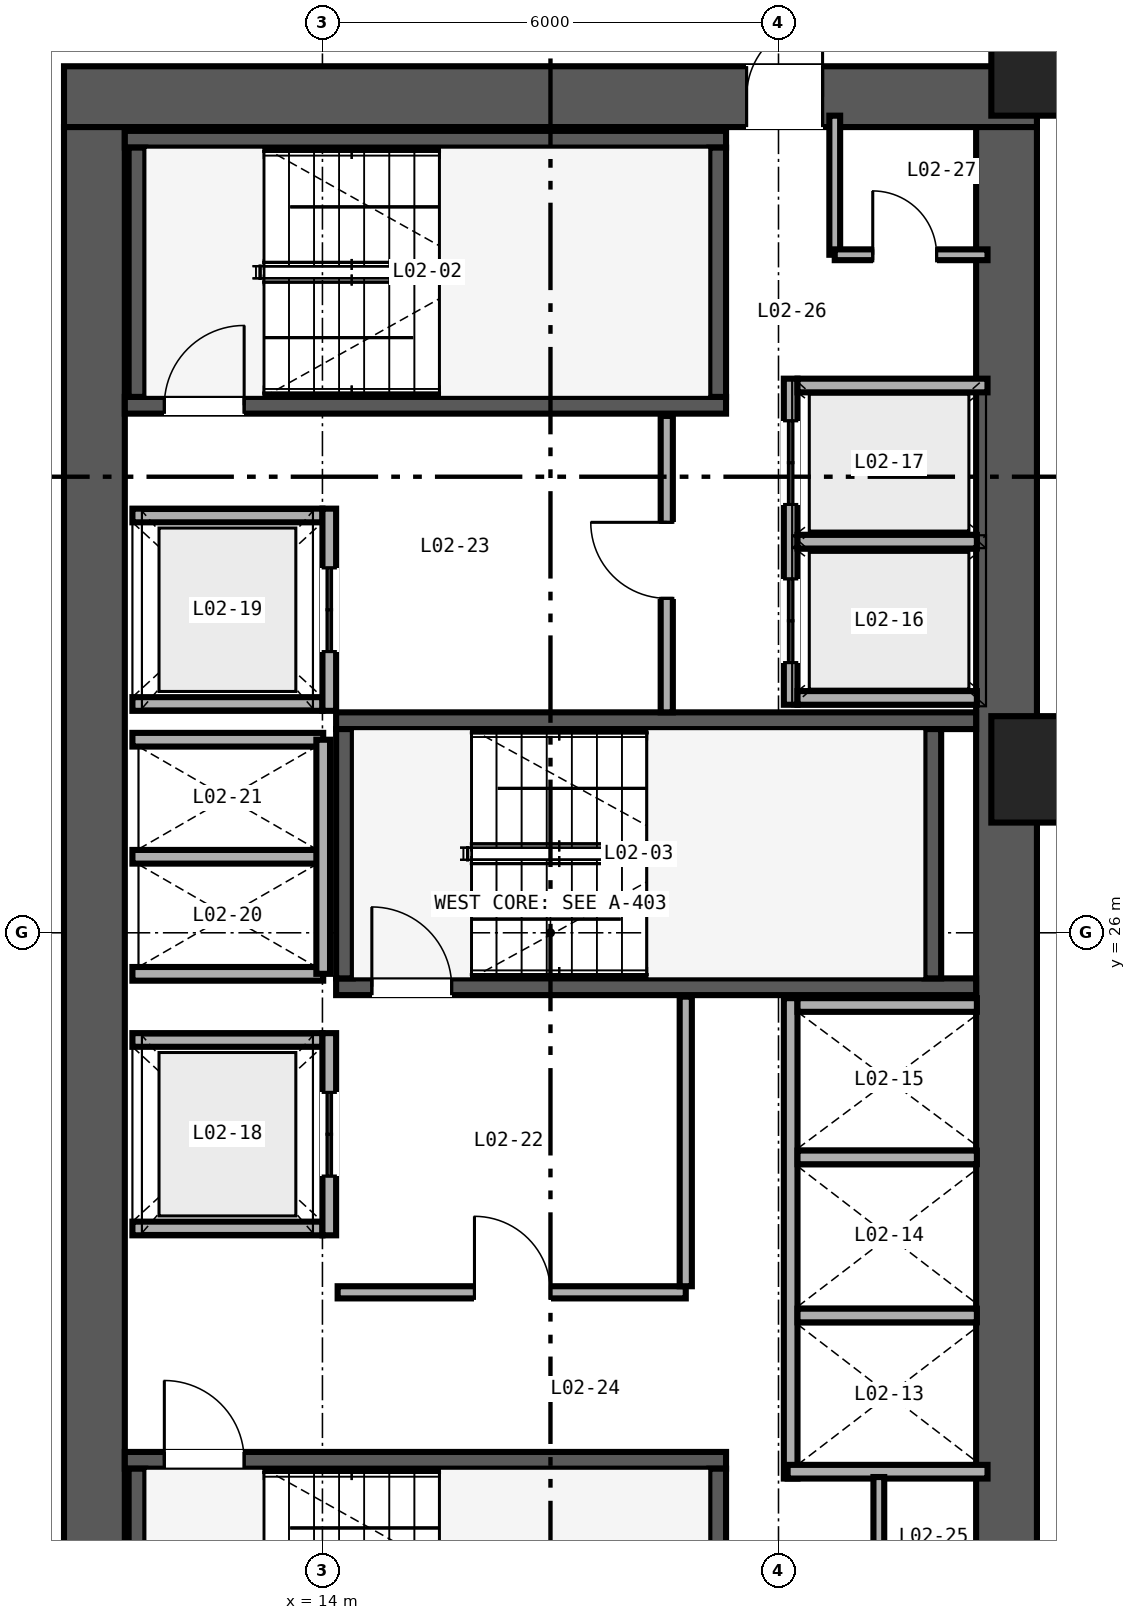
"""IFC4 building model, lengths in metres.
Left out: names, types, materials, properties, quantities, classifications, styles, units other than length and angle.
Written with IfcOpenShell. Run it as: python <this file> out.ifc"""

import sys

from ifc_helpers import new_model, si_unit, direction, frame, frame_2d, origin, origin_2d, place, context, subcontext, project, spatial, rectangle, extrude, source, transform, mapped, element, fill, save


model = new_model("IFC4")
c1 = context("Model", 3, precision=1e-05, world=origin(), true_north=direction((0.0, 1.0)))
c2 = subcontext(c1, "Body", "Model", "MODEL_VIEW")
j1 = project(units=[si_unit("LENGTHUNIT", "METRE"), si_unit("PLANEANGLEUNIT", "RADIAN")], contexts=[c1])
p1 = place(None, origin())
s1 = spatial("IfcSite", under=j1, at=p1, CompositionType="ELEMENT")
p2 = place(p1, origin())
s2 = spatial("IfcBuilding", under=s1, at=p2, CompositionType="ELEMENT")
p3 = place(p2, frame((0.0, 0.0, 6.0)))
s3 = spatial("IfcBuildingStorey", under=s2, at=p3, CompositionType="ELEMENT", Elevation=6.0)
p4 = place(p3, frame((10.6, 37.0, 0.0), z_axis=(0.0, 0.0, 1.0), x_axis=(1.0, 0.0, 0.0)))
e1 = element("IfcWall", 1, at=p4, inside=s3, PredefinedType="SHEAR", context=c2, shape_type="SweptSolid", body=[
    extrude(rectangle(XDim=12.8, YDim=0.8, at=frame_2d((6.4, 0.0))), origin(), (0.0, 0.0, 1.0), 5.08),
])
p5 = place(p4, frame((8.98, 0.0, 0.0)))
e2 = element("IfcOpeningElement", 2, at=p5, cuts=e1, PredefinedType="OPENING", context=c2, shape_type="SweptSolid", body=[
    extrude(rectangle(XDim=1.0, YDim=2.15, at=frame_2d((0.5, 1.075))), frame((0.0, 0.41, 0.0), z_axis=(0.0, -1.0, 0.0), x_axis=(1.0, 0.0, 0.0)), (0.0, 0.0, 1.0), 0.82),
])
for number, where, z_axis, x_axis in (
    (3, (11.0, 15.4, 0.0), (0.0, 0.0, 1.0), (0.0, 1.0, 0.0)),
    (4, (23.0, 15.4, 0.0), (0.0, 0.0, 1.0), (0.0, 1.0, 0.0)),
):
    element("IfcWall", number, at=place(p3, frame(where, z_axis=z_axis, x_axis=x_axis)), inside=s3, PredefinedType="SHEAR", context=c2, shape_type="SweptSolid", body=[
        extrude(rectangle(XDim=21.2, YDim=0.8, at=frame_2d((10.6, 0.0))), origin(), (0.0, 0.0, 1.0), 5.08),
    ])
p6 = place(p3, frame((11.4, 19.06, 0.0), z_axis=(0.0, 0.0, 1.0), x_axis=(1.0, 0.0, 0.0)))
e5 = element("IfcWall", 5, at=p6, inside=s3, PredefinedType="SHEAR", context=c2, shape_type="SweptSolid", body=[
    extrude(rectangle(XDim=7.91, YDim=0.22, at=frame_2d((3.955, 0.0))), origin(), (0.0, 0.0, 1.0), 5.2),
])
p7 = place(p6, frame((0.52, 0.0, 0.0)))
e6 = element("IfcOpeningElement", 6, at=p7, cuts=e5, PredefinedType="OPENING", context=c2, shape_type="SweptSolid", body=[
    extrude(rectangle(XDim=1.05, YDim=2.15, at=frame_2d((0.525, 1.075))), frame((0.0, 0.12, 0.0), z_axis=(0.0, -1.0, 0.0), x_axis=(1.0, 0.0, 0.0)), (0.0, 0.0, 1.0), 0.24),
])
for number, where, z_axis, x_axis in (
    (7, (11.56, 15.67, 0.0), (0.0, 0.0, 1.0), (0.0, 1.0, 0.0)),
    (8, (19.2, 15.67, 0.0), (0.0, 0.0, 1.0), (0.0, 1.0, 0.0)),
):
    element("IfcWall", number, at=place(p3, frame(where, z_axis=z_axis, x_axis=x_axis)), inside=s3, PredefinedType="SHEAR", context=c2, shape_type="SweptSolid", body=[
        extrude(rectangle(XDim=3.28, YDim=0.22, at=frame_2d((1.64, 0.0))), origin(), (0.0, 0.0, 1.0), 5.2),
    ])
p8 = place(p3, frame((11.4, 32.94, 0.0), z_axis=(0.0, 0.0, 1.0), x_axis=(1.0, 0.0, 0.0)))
e9 = element("IfcWall", 9, at=p8, inside=s3, PredefinedType="SHEAR", context=c2, shape_type="SweptSolid", body=[
    extrude(rectangle(XDim=7.91, YDim=0.22, at=frame_2d((3.955, 0.0))), origin(), (0.0, 0.0, 1.0), 5.2),
])
p9 = place(p8, frame((0.52, 0.0, 0.0)))
e10 = element("IfcOpeningElement", 10, at=p9, cuts=e9, PredefinedType="OPENING", context=c2, shape_type="SweptSolid", body=[
    extrude(rectangle(XDim=1.05, YDim=2.15, at=frame_2d((0.525, 1.075))), frame((0.0, 0.12, 0.0), z_axis=(0.0, -1.0, 0.0), x_axis=(1.0, 0.0, 0.0)), (0.0, 0.0, 1.0), 0.24),
])
p10 = place(p3, frame((11.4, 36.44, 0.0), z_axis=(0.0, 0.0, 1.0), x_axis=(1.0, 0.0, 0.0)))
e11 = element("IfcWall", 11, at=p10, inside=s3, PredefinedType="SHEAR", context=c2, shape_type="SweptSolid", body=[
    extrude(rectangle(XDim=7.91, YDim=0.22, at=frame_2d((3.955, 0.0))), origin(), (0.0, 0.0, 1.0), 5.2),
])
for number, where, z_axis, x_axis in (
    (12, (11.56, 33.05, 0.0), (0.0, 0.0, 1.0), (0.0, 1.0, 0.0)),
    (13, (19.2, 33.05, 0.0), (0.0, 0.0, 1.0), (0.0, 1.0, 0.0)),
):
    element("IfcWall", number, at=place(p3, frame(where, z_axis=z_axis, x_axis=x_axis)), inside=s3, PredefinedType="SHEAR", context=c2, shape_type="SweptSolid", body=[
        extrude(rectangle(XDim=3.28, YDim=0.22, at=frame_2d((1.64, 0.0))), origin(), (0.0, 0.0, 1.0), 5.2),
    ])
p11 = place(p3, frame((14.18, 25.29, 0.0), z_axis=(0.0, 0.0, 1.0), x_axis=(1.0, 0.0, 0.0)))
e14 = element("IfcWall", 14, at=p11, inside=s3, PredefinedType="SHEAR", context=c2, shape_type="SweptSolid", body=[
    extrude(rectangle(XDim=8.42, YDim=0.22, at=frame_2d((4.21, 0.0))), origin(), (0.0, 0.0, 1.0), 5.2),
])
p12 = place(p11, frame((0.47, 0.0, 0.0)))
e15 = element("IfcOpeningElement", 15, at=p12, cuts=e14, PredefinedType="OPENING", context=c2, shape_type="SweptSolid", body=[
    extrude(rectangle(XDim=1.05, YDim=2.15, at=frame_2d((0.525, 1.075))), frame((0.0, 0.12, 0.0), z_axis=(0.0, -1.0, 0.0), x_axis=(1.0, 0.0, 0.0)), (0.0, 0.0, 1.0), 0.24),
])
p13 = place(p3, frame((14.18, 28.79, 0.0), z_axis=(0.0, 0.0, 1.0), x_axis=(1.0, 0.0, 0.0)))
e16 = element("IfcWall", 16, at=p13, inside=s3, PredefinedType="SHEAR", context=c2, shape_type="SweptSolid", body=[
    extrude(rectangle(XDim=8.42, YDim=0.22, at=frame_2d((4.21, 0.0))), origin(), (0.0, 0.0, 1.0), 5.2),
])
for number, where, z_axis, x_axis in (
    (17, (14.29, 25.4, 0.0), (0.0, 0.0, 1.0), (0.0, 1.0, 0.0)),
    (18, (22.03, 25.4, 0.0), (0.0, 0.0, 1.0), (0.0, 1.0, 0.0)),
):
    element("IfcWall", number, at=place(p3, frame(where, z_axis=z_axis, x_axis=x_axis)), inside=s3, PredefinedType="SHEAR", context=c2, shape_type="SweptSolid", body=[
        extrude(rectangle(XDim=3.28, YDim=0.22, at=frame_2d((1.64, 0.0))), origin(), (0.0, 0.0, 1.0), 5.2),
    ])
m1 = source(origin(), c2, "Body", "SweptSolid", [
    extrude(rectangle(XDim=1.4, YDim=1.4, at=origin_2d()), origin(), (0.0, 0.0, 1.0), 5.08),
])
for number, where, z_axis, x_axis in (
    (19, (23.5, 28.15, 0.0), (0.0, 0.0, 1.0), (1.0, 0.0, 0.0)),
    (20, (23.5, 37.45, 0.0), (0.0, 0.0, 1.0), (1.0, 0.0, 0.0)),
):
    element("IfcColumn", number, at=place(p3, frame(where, z_axis=z_axis, x_axis=x_axis)), inside=s3, PredefinedType="COLUMN", context=c2, shape_type="MappedRepresentation", body=[
        mapped(m1, transform((0.0, 0.0, 0.0), scale=1.0)),
    ])
p14 = place(p3, frame((20.16, 18.82, 0.0), z_axis=(0.0, 0.0, 1.0), x_axis=(0.0, 1.0, 0.0)))
e21 = element("IfcWall", 21, at=p14, inside=s3, PredefinedType="SOLIDWALL", context=c2, shape_type="SweptSolid", body=[
    extrude(rectangle(XDim=6.32, YDim=0.18, at=frame_2d((3.16, 0.0))), origin(), (0.0, 0.0, 1.0), 3.98),
])
p15 = place(p3, frame((20.12, 18.91, 0.0), z_axis=(0.0, 0.0, 1.0), x_axis=(1.0, 0.0, 0.0)))
e22 = element("IfcWall", 22, at=p15, inside=s3, PredefinedType="SOLIDWALL", context=c2, shape_type="SweptSolid", body=[
    extrude(rectangle(XDim=2.63, YDim=0.18, at=frame_2d((1.315, 0.0))), origin(), (0.0, 0.0, 1.0), 5.08),
])
p16 = place(p3, frame((20.25, 25.05, 0.0), z_axis=(0.0, 0.0, 1.0), x_axis=(1.0, 0.0, 0.0)))
e23 = element("IfcWall", 23, at=p16, inside=s3, PredefinedType="SOLIDWALL", context=c2, shape_type="SweptSolid", body=[
    extrude(rectangle(XDim=2.36, YDim=0.18, at=frame_2d((1.18, 0.0))), origin(), (0.0, 0.0, 1.0), 5.08),
])
p17 = place(p3, frame((20.25, 20.965, 0.0), z_axis=(0.0, 0.0, 1.0), x_axis=(1.0, 0.0, 0.0)))
e24 = element("IfcWall", 24, at=p17, inside=s3, PredefinedType="SOLIDWALL", context=c2, shape_type="SweptSolid", body=[
    extrude(rectangle(XDim=2.36, YDim=0.18, at=frame_2d((1.18, 0.0))), origin(), (0.0, 0.0, 1.0), 3.98),
])
p18 = place(p3, frame((20.25, 23.045, 0.0), z_axis=(0.0, 0.0, 1.0), x_axis=(1.0, 0.0, 0.0)))
e25 = element("IfcWall", 25, at=p18, inside=s3, PredefinedType="SOLIDWALL", context=c2, shape_type="SweptSolid", body=[
    extrude(rectangle(XDim=2.36, YDim=0.18, at=frame_2d((1.18, 0.0))), origin(), (0.0, 0.0, 1.0), 5.08),
])
p19 = place(p3, frame((20.16, 29.0, 0.0), z_axis=(0.0, 0.0, 1.0), x_axis=(0.0, 1.0, 0.0)))
e26 = element("IfcWall", 26, at=p19, inside=s3, PredefinedType="SOLIDWALL", context=c2, shape_type="SweptSolid", body=[
    extrude(rectangle(XDim=4.29, YDim=0.18, at=frame_2d((2.145, 0.0))), origin(), (0.0, 0.0, 1.0), 5.08),
])
p20 = place(p19, frame((0.555, 0.0, 0.0)))
e27 = element("IfcOpeningElement", 27, at=p20, cuts=e26, PredefinedType="OPENING", context=c2, shape_type="SweptSolid", body=[
    extrude(rectangle(XDim=1.1, YDim=2.2, at=frame_2d((0.55, 1.1))), frame((0.0, 0.1, 0.0), z_axis=(0.0, -1.0, 0.0), x_axis=(1.0, 0.0, 0.0)), (0.0, 0.0, 1.0), 0.2),
])
p21 = place(p19, frame((2.635, 0.0, 0.0)))
e28 = element("IfcOpeningElement", 28, at=p21, cuts=e26, PredefinedType="OPENING", context=c2, shape_type="SweptSolid", body=[
    extrude(rectangle(XDim=1.1, YDim=2.2, at=frame_2d((0.55, 1.1))), frame((0.0, 0.1, 0.0), z_axis=(0.0, -1.0, 0.0), x_axis=(1.0, 0.0, 0.0)), (0.0, 0.0, 1.0), 0.2),
])
p22 = place(p3, frame((20.25, 29.09, 0.0), z_axis=(0.0, 0.0, 1.0), x_axis=(1.0, 0.0, 0.0)))
e29 = element("IfcWall", 29, at=p22, inside=s3, PredefinedType="SOLIDWALL", context=c2, shape_type="SweptSolid", body=[
    extrude(rectangle(XDim=2.36, YDim=0.18, at=frame_2d((1.18, 0.0))), origin(), (0.0, 0.0, 1.0), 5.08),
])
p23 = place(p3, frame((20.25, 33.2, 0.0), z_axis=(0.0, 0.0, 1.0), x_axis=(1.0, 0.0, 0.0)))
e30 = element("IfcWall", 30, at=p23, inside=s3, PredefinedType="SOLIDWALL", context=c2, shape_type="SweptSolid", body=[
    extrude(rectangle(XDim=2.5, YDim=0.18, at=frame_2d((1.25, 0.0))), origin(), (0.0, 0.0, 1.0), 5.08),
])
p24 = place(p3, frame((20.25, 31.145, 0.0), z_axis=(0.0, 0.0, 1.0), x_axis=(1.0, 0.0, 0.0)))
e31 = element("IfcWall", 31, at=p24, inside=s3, PredefinedType="SOLIDWALL", context=c2, shape_type="SweptSolid", body=[
    extrude(rectangle(XDim=2.36, YDim=0.18, at=frame_2d((1.18, 0.0))), origin(), (0.0, 0.0, 1.0), 5.08),
])
for number, where, z_axis, x_axis in (
    (32, (11.5, 22.11, 0.0), (0.0, 0.0, 1.0), (1.0, 0.0, 0.0)),
    (33, (11.5, 24.59, 0.0), (0.0, 0.0, 1.0), (1.0, 0.0, 0.0)),
):
    element("IfcWall", number, at=place(p3, frame(where, z_axis=z_axis, x_axis=x_axis)), inside=s3, PredefinedType="SOLIDWALL", context=c2, shape_type="SweptSolid", body=[
        extrude(rectangle(XDim=2.5, YDim=0.18, at=frame_2d((1.25, 0.0))), origin(), (0.0, 0.0, 1.0), 5.08),
    ])
p25 = place(p3, frame((14.09, 22.02, 0.0), z_axis=(0.0, 0.0, 1.0), x_axis=(0.0, 1.0, 0.0)))
e34 = element("IfcWall", 34, at=p25, inside=s3, PredefinedType="SOLIDWALL", context=c2, shape_type="SweptSolid", body=[
    extrude(rectangle(XDim=2.66, YDim=0.18, at=frame_2d((1.33, 0.0))), origin(), (0.0, 0.0, 1.0), 5.08),
])
p26 = place(p25, frame((0.78, 0.0, 0.0)))
e35 = element("IfcOpeningElement", 35, at=p26, cuts=e34, PredefinedType="OPENING", context=c2, shape_type="SweptSolid", body=[
    extrude(rectangle(XDim=1.1, YDim=2.2, at=frame_2d((0.55, 1.1))), frame((0.0, 0.1, 0.0), z_axis=(0.0, -1.0, 0.0), x_axis=(1.0, 0.0, 0.0)), (0.0, 0.0, 1.0), 0.2),
])
for number, where, z_axis, x_axis in (
    (36, (11.5, 29.01, 0.0), (0.0, 0.0, 1.0), (1.0, 0.0, 0.0)),
    (37, (11.5, 31.49, 0.0), (0.0, 0.0, 1.0), (1.0, 0.0, 0.0)),
):
    element("IfcWall", number, at=place(p3, frame(where, z_axis=z_axis, x_axis=x_axis)), inside=s3, PredefinedType="SOLIDWALL", context=c2, shape_type="SweptSolid", body=[
        extrude(rectangle(XDim=2.5, YDim=0.18, at=frame_2d((1.25, 0.0))), origin(), (0.0, 0.0, 1.0), 5.08),
    ])
p27 = place(p3, frame((14.09, 28.92, 0.0), z_axis=(0.0, 0.0, 1.0), x_axis=(0.0, 1.0, 0.0)))
e38 = element("IfcWall", 38, at=p27, inside=s3, PredefinedType="SOLIDWALL", context=c2, shape_type="SweptSolid", body=[
    extrude(rectangle(XDim=2.66, YDim=0.18, at=frame_2d((1.33, 0.0))), origin(), (0.0, 0.0, 1.0), 5.08),
])
p28 = place(p27, frame((0.78, 0.0, 0.0)))
e39 = element("IfcOpeningElement", 39, at=p28, cuts=e38, PredefinedType="OPENING", context=c2, shape_type="SweptSolid", body=[
    extrude(rectangle(XDim=1.1, YDim=2.2, at=frame_2d((0.55, 1.1))), frame((0.0, 0.1, 0.0), z_axis=(0.0, -1.0, 0.0), x_axis=(1.0, 0.0, 0.0)), (0.0, 0.0, 1.0), 0.2),
])
for number, where, z_axis, x_axis in (
    (40, (11.5, 25.46, 0.0), (0.0, 0.0, 1.0), (1.0, 0.0, 0.0)),
    (41, (11.5, 27.0, 0.0), (0.0, 0.0, 1.0), (1.0, 0.0, 0.0)),
    (42, (11.5, 28.54, 0.0), (0.0, 0.0, 1.0), (1.0, 0.0, 0.0)),
):
    element("IfcWall", number, at=place(p3, frame(where, z_axis=z_axis, x_axis=x_axis)), inside=s3, PredefinedType="SOLIDWALL", context=c2, shape_type="SweptSolid", body=[
        extrude(rectangle(XDim=2.51, YDim=0.18, at=frame_2d((1.255, 0.0))), origin(), (0.0, 0.0, 1.0), 5.08),
    ])
p29 = place(p3, frame((14.01, 25.46, 0.0), z_axis=(0.0, 0.0, 1.0), x_axis=(0.0, 1.0, 0.0)))
e43 = element("IfcWall", 43, at=p29, inside=s3, PredefinedType="SOLIDWALL", context=c2, shape_type="SweptSolid", body=[
    extrude(rectangle(XDim=3.08, YDim=0.18, at=frame_2d((1.54, 0.0))), origin(), (0.0, 0.0, 1.0), 5.08),
])
p30 = place(p3, frame((14.2, 21.27, 0.0), z_axis=(0.0, 0.0, 1.0), x_axis=(1.0, 0.0, 0.0)))
e44 = element("IfcWall", 44, at=p30, inside=s3, PredefinedType="PARTITIONING", context=c2, shape_type="SweptSolid", body=[
    extrude(rectangle(XDim=4.58, YDim=0.16, at=frame_2d((2.29, 0.0))), origin(), (0.0, 0.0, 1.0), 5.08),
])
p31 = place(p30, frame((1.8, 0.0, 0.0)))
e45 = element("IfcOpeningElement", 45, at=p31, cuts=e44, PredefinedType="OPENING", context=c2, shape_type="SweptSolid", body=[
    extrude(rectangle(XDim=1.0, YDim=2.15, at=frame_2d((0.5, 1.075))), frame((0.0, 0.09, 0.0), z_axis=(0.0, -1.0, 0.0), x_axis=(1.0, 0.0, 0.0)), (0.0, 0.0, 1.0), 0.18),
])
p32 = place(p3, frame((18.78, 21.35, 0.0), z_axis=(0.0, 0.0, 1.0), x_axis=(0.0, 1.0, 0.0)))
e46 = element("IfcWall", 46, at=p32, inside=s3, PredefinedType="PARTITIONING", context=c2, shape_type="SweptSolid", body=[
    extrude(rectangle(XDim=3.81, YDim=0.16, at=frame_2d((1.905, 0.0))), origin(), (0.0, 0.0, 1.0), 5.08),
])
p33 = place(p3, frame((18.53, 28.9, 0.0), z_axis=(0.0, 0.0, 1.0), x_axis=(0.0, 1.0, 0.0)))
e47 = element("IfcWall", 47, at=p33, inside=s3, PredefinedType="PARTITIONING", context=c2, shape_type="SweptSolid", body=[
    extrude(rectangle(XDim=3.9, YDim=0.16, at=frame_2d((1.95, 0.0))), origin(), (0.0, 0.0, 1.0), 5.08),
])
p34 = place(p33, frame((1.5, 0.0, 0.0)))
e48 = element("IfcOpeningElement", 48, at=p34, cuts=e47, PredefinedType="OPENING", context=c2, shape_type="SweptSolid", body=[
    extrude(rectangle(XDim=1.0, YDim=2.15, at=frame_2d((0.5, 1.075))), frame((0.0, 0.09, 0.0), z_axis=(0.0, -1.0, 0.0), x_axis=(1.0, 0.0, 0.0)), (0.0, 0.0, 1.0), 0.18),
])
p35 = place(p3, frame((21.32, 15.25, 0.0), z_axis=(0.0, 0.0, 1.0), x_axis=(0.0, 1.0, 0.0)))
e49 = element("IfcWall", 49, at=p35, inside=s3, PredefinedType="PARTITIONING", context=c2, shape_type="SweptSolid", body=[
    extrude(rectangle(XDim=3.59, YDim=0.142, at=frame_2d((1.795, 0.0))), origin(), (0.0, 0.0, 1.0), 5.08),
])
p36 = place(p35, frame((1.25, 0.0, 0.0)))
e50 = element("IfcOpeningElement", 50, at=p36, cuts=e49, PredefinedType="OPENING", context=c2, shape_type="SweptSolid", body=[
    extrude(rectangle(XDim=0.84, YDim=2.1, at=frame_2d((0.42, 1.05))), frame((0.0, 0.081, 0.0), z_axis=(0.0, -1.0, 0.0), x_axis=(1.0, 0.0, 0.0)), (0.0, 0.0, 1.0), 0.162),
])
p37 = place(p3, frame((20.74, 34.92, 0.0), z_axis=(0.0, 0.0, 1.0), x_axis=(0.0, 1.0, 0.0)))
e51 = element("IfcWall", 51, at=p37, inside=s3, PredefinedType="PARTITIONING", context=c2, shape_type="SweptSolid", body=[
    extrude(rectangle(XDim=1.83, YDim=0.142, at=frame_2d((0.915, 0.0))), origin(), (0.0, 0.0, 1.0), 5.08),
])
p38 = place(p3, frame((20.74, 34.92, 0.0), z_axis=(0.0, 0.0, 1.0), x_axis=(1.0, 0.0, 0.0)))
e52 = element("IfcWall", 52, at=p38, inside=s3, PredefinedType="PARTITIONING", context=c2, shape_type="SweptSolid", body=[
    extrude(rectangle(XDim=2.01, YDim=0.142, at=frame_2d((1.005, 0.0))), origin(), (0.0, 0.0, 1.0), 5.08),
])
p39 = place(p38, frame((0.5, 0.0, 0.0)))
e53 = element("IfcOpeningElement", 53, at=p39, cuts=e52, PredefinedType="OPENING", context=c2, shape_type="SweptSolid", body=[
    extrude(rectangle(XDim=0.84, YDim=2.1, at=frame_2d((0.42, 1.05))), frame((0.0, 0.081, 0.0), z_axis=(0.0, -1.0, 0.0), x_axis=(1.0, 0.0, 0.0)), (0.0, 0.0, 1.0), 0.162),
])
m2 = source(origin(), c2, "Body", "SweptSolid", [
    extrude(rectangle(XDim=1.05, YDim=2.15, at=frame_2d((0.525, 1.075))), frame((0.0, 0.025, 0.0), z_axis=(0.0, -1.0, 0.0), x_axis=(1.0, 0.0, 0.0)), (0.0, 0.0, 1.0), 0.05),
])
p40 = place(p7, origin())
e54 = element("IfcDoor", 54, at=p40, inside=s3, OperationType="SINGLE_SWING_LEFT", PredefinedType="DOOR", context=c2, shape_type="MappedRepresentation", body=[
    mapped(m2, transform((0.0, 0.0, 0.0), scale=1.0)),
])
fill(e6, e54)
p41 = place(p9, origin())
e55 = element("IfcDoor", 55, at=p41, inside=s3, OperationType="SINGLE_SWING_RIGHT", PredefinedType="DOOR", context=c2, shape_type="MappedRepresentation", body=[
    mapped(m2, transform((0.0, 0.0, 0.0), scale=1.0)),
])
fill(e10, e55)
p42 = place(p12, origin())
e56 = element("IfcDoor", 56, at=p42, inside=s3, OperationType="SINGLE_SWING_LEFT", PredefinedType="DOOR", context=c2, shape_type="MappedRepresentation", body=[
    mapped(m2, transform((0.0, 0.0, 0.0), scale=1.0)),
])
fill(e15, e56)
m3 = source(origin(), c2, "Body", "SweptSolid", [
    extrude(rectangle(XDim=1.1, YDim=2.2, at=frame_2d((0.55, 1.1))), frame((0.0, 0.025, 0.0), z_axis=(0.0, -1.0, 0.0), x_axis=(1.0, 0.0, 0.0)), (0.0, 0.0, 1.0), 0.05),
])
p43 = place(p20, origin())
e57 = element("IfcDoor", 57, at=p43, inside=s3, OperationType="DOUBLE_DOOR_SLIDING", PredefinedType="DOOR", context=c2, shape_type="MappedRepresentation", body=[
    mapped(m3, transform((0.0, 0.0, 0.0), scale=1.0)),
])
fill(e27, e57)
p44 = place(p21, origin())
e58 = element("IfcDoor", 58, at=p44, inside=s3, OperationType="DOUBLE_DOOR_SLIDING", PredefinedType="DOOR", context=c2, shape_type="MappedRepresentation", body=[
    mapped(m3, transform((0.0, 0.0, 0.0), scale=1.0)),
])
fill(e28, e58)
p45 = place(p26, origin())
e59 = element("IfcDoor", 59, at=p45, inside=s3, OperationType="DOUBLE_DOOR_SLIDING", PredefinedType="DOOR", context=c2, shape_type="MappedRepresentation", body=[
    mapped(m3, transform((0.0, 0.0, 0.0), scale=1.0)),
])
fill(e35, e59)
p46 = place(p28, origin())
e60 = element("IfcDoor", 60, at=p46, inside=s3, OperationType="DOUBLE_DOOR_SLIDING", PredefinedType="DOOR", context=c2, shape_type="MappedRepresentation", body=[
    mapped(m3, transform((0.0, 0.0, 0.0), scale=1.0)),
])
fill(e39, e60)
m4 = source(origin(), c2, "Body", "SweptSolid", [
    extrude(rectangle(XDim=1.0, YDim=2.15, at=frame_2d((0.5, 1.075))), frame((0.0, 0.025, 0.0), z_axis=(0.0, -1.0, 0.0), x_axis=(1.0, 0.0, 0.0)), (0.0, 0.0, 1.0), 0.05),
])
p47 = place(p31, origin())
e61 = element("IfcDoor", 61, at=p47, inside=s3, OperationType="SINGLE_SWING_LEFT", PredefinedType="DOOR", context=c2, shape_type="MappedRepresentation", body=[
    mapped(m4, transform((0.0, 0.0, 0.0), scale=1.0)),
])
fill(e45, e61)
p48 = place(p34, origin())
e62 = element("IfcDoor", 62, at=p48, inside=s3, OperationType="SINGLE_SWING_RIGHT", PredefinedType="DOOR", context=c2, shape_type="MappedRepresentation", body=[
    mapped(m4, transform((0.0, 0.0, 0.0), scale=1.0)),
])
fill(e48, e62)
m5 = source(origin(), c2, "Body", "SweptSolid", [
    extrude(rectangle(XDim=0.84, YDim=2.1, at=frame_2d((0.42, 1.05))), frame((0.0, 0.025, 0.0), z_axis=(0.0, -1.0, 0.0), x_axis=(1.0, 0.0, 0.0)), (0.0, 0.0, 1.0), 0.05),
])
p49 = place(p39, origin())
e63 = element("IfcDoor", 63, at=p49, inside=s3, OperationType="SINGLE_SWING_LEFT", PredefinedType="DOOR", context=c2, shape_type="MappedRepresentation", body=[
    mapped(m5, transform((0.0, 0.0, 0.0), scale=1.0)),
])
fill(e53, e63)
p50 = place(p5, origin())
e64 = element("IfcDoor", 64, at=p50, inside=s3, OperationType="SINGLE_SWING_RIGHT", PredefinedType="DOOR", context=c2, shape_type="MappedRepresentation", body=[
    mapped(m4, transform((0.0, 0.0, 0.0), scale=1.0)),
])
fill(e2, e64)
save(model, sys.argv[1])
